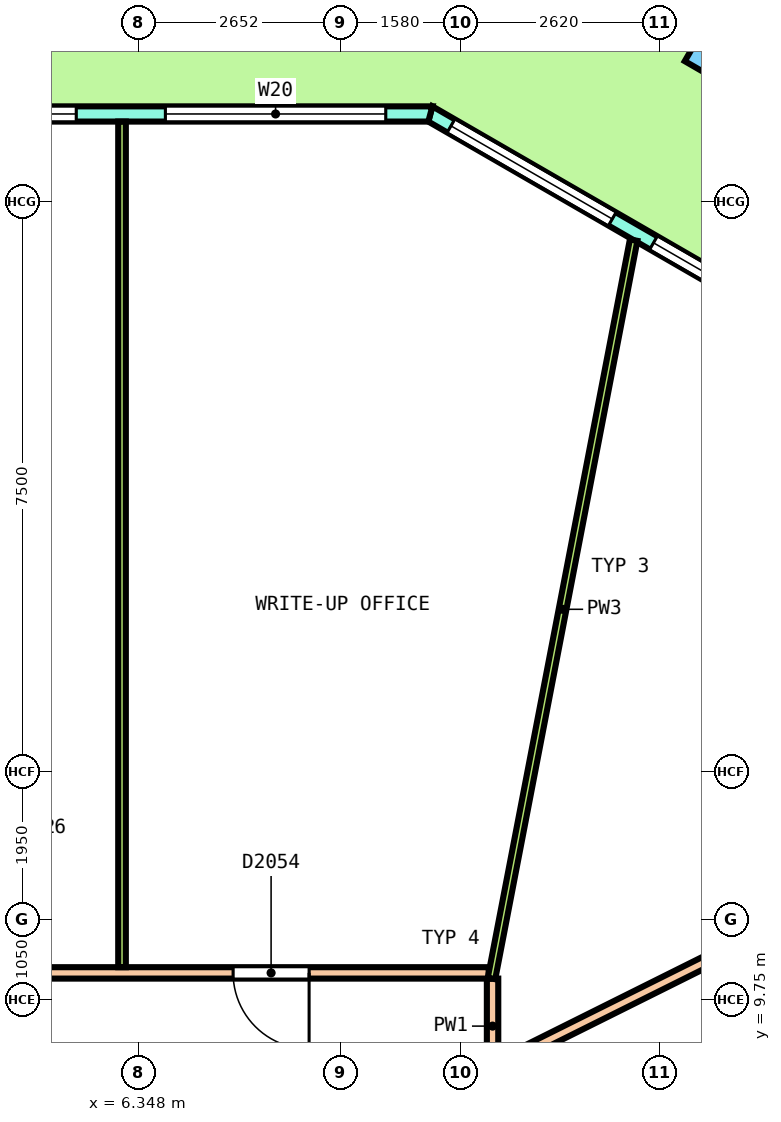
"""IFC4 building model, lengths in metres.
Left out: names, types, materials, properties, quantities, classifications, styles, units other than length and angle.
Written with IfcOpenShell. Run it as: python <this file> out.ifc"""

import sys

from ifc_helpers import new_model, si_unit, direction, frame, frame_2d, origin, origin_2d, place, context, subcontext, project, spatial, polyline, rectangle, outline, extrude, element, fill, save


model = new_model("IFC4")
c1 = context("Model", 3, precision=1e-05, world=origin(), true_north=direction((0.0, 1.0)))
c2 = subcontext(c1, "Body", "Model", "MODEL_VIEW")
j1 = project(units=[si_unit("LENGTHUNIT", "METRE"), si_unit("PLANEANGLEUNIT", "RADIAN")], contexts=[c1])
p1 = place(None, origin())
s1 = spatial("IfcSite", under=j1, at=p1, CompositionType="ELEMENT")
p2 = place(p1, origin())
s2 = spatial("IfcBuilding", under=s1, at=p2, CompositionType="ELEMENT")
p3 = place(p2, frame((0.0, 0.0, 249.4)))
s3 = spatial("IfcBuildingStorey", under=s2, at=p3, CompositionType="ELEMENT", Elevation=249.4)
p4 = place(p3, frame((14.246, 22.287, 0.0), z_axis=(0.036260511264, 0.0, 0.999342371424), x_axis=(-0.865313694921, 0.500246354177, 0.031397364786)))
e1 = element("IfcColumn", 1, at=p4, inside=s3, PredefinedType="COLUMN", context=c2, shape_type="SweptSolid", body=[
    extrude(rectangle(XDim=1.05, YDim=1.05, at=origin_2d()), origin(), (0.0, 0.0, 1.0), 3.643),
])
p5 = place(p3, frame((15.51, 18.323, 0.0), z_axis=(0.0, 0.0, 1.0), x_axis=(-0.866029647142, 0.499992650217, 0.0)))
e2 = element("IfcWall", 2, at=p5, inside=s3, PredefinedType="SOLIDWALL", context=c2, shape_type="SweptSolid", body=[
    extrude(outline(polyline([(-0.027, -0.1), (1.008, -0.1), (2.042, -0.1), (3.076, -0.1), (4.111, -0.1), (5.145, -0.1), (6.18, -0.1), (6.126, 0.1), (5.109, 0.1), (4.093, 0.1), (3.076, 0.1), (2.06, 0.1), (1.043, 0.1), (0.027, 0.1), (-0.027, -0.1)])), origin(), (0.0, 0.0, 1.0), 3.7),
])
p6 = place(p5, frame((0.313, 0.0, 0.1)))
e3 = element("IfcOpeningElement", 3, at=p6, cuts=e2, PredefinedType="OPENING", context=c2, shape_type="SweptSolid", body=[
    extrude(rectangle(XDim=2.45, YDim=2.65, at=frame_2d((1.225, 1.325))), frame((0.0, 0.11, 0.0), z_axis=(0.0, -1.0, 0.0), x_axis=(1.0, 0.0, 0.0)), (0.0, 0.0, 1.0), 0.22),
])
p7 = place(p5, frame((3.39, 0.0, 0.1)))
e4 = element("IfcOpeningElement", 4, at=p7, cuts=e2, PredefinedType="OPENING", context=c2, shape_type="SweptSolid", body=[
    extrude(rectangle(XDim=2.45, YDim=2.65, at=frame_2d((1.225, 1.325))), frame((0.0, 0.11, 0.0), z_axis=(0.0, -1.0, 0.0), x_axis=(1.0, 0.0, 0.0)), (0.0, 0.0, 1.0), 0.22),
])
p8 = place(p3, frame((10.182, 21.4, 0.0), z_axis=(0.0, 0.0, 1.0), x_axis=(-1.0, 0.0, 0.0)))
e5 = element("IfcWall", 5, at=p8, inside=s3, PredefinedType="SOLIDWALL", context=c2, shape_type="SweptSolid", body=[
    extrude(outline(polyline([(-0.027, -0.1), (0.994, -0.1), (2.015, -0.1), (3.036, -0.1), (4.057, -0.1), (5.078, -0.1), (6.098, -0.1), (7.119, -0.1), (8.14, -0.1), (9.161, -0.1), (10.182, -0.1), (11.203, -0.1), (12.224, -0.1), (13.245, -0.1), (14.265, -0.1), (15.286, -0.1), (16.307, -0.1), (17.328, -0.1), (18.349, -0.1), (19.37, -0.1), (20.391, -0.1), (20.337, 0.1), (19.321, 0.1), (18.306, 0.1), (17.291, 0.1), (16.275, 0.1), (15.259, 0.1), (14.244, 0.1), (13.229, 0.1), (12.213, 0.1), (11.197, 0.1), (10.182, 0.1), (9.167, 0.1), (8.151, 0.1), (7.135, 0.1), (6.12, 0.1), (5.104, 0.1), (4.089, 0.1), (3.073, 0.1), (2.058, 0.1), (1.042, 0.1), (0.027, 0.1), (-0.027, -0.1)])), origin(), (0.0, 0.0, 1.0), 3.7),
])
p9 = place(p8, frame((0.586, 0.0, 0.1)))
e6 = element("IfcOpeningElement", 6, at=p9, cuts=e5, PredefinedType="OPENING", context=c2, shape_type="SweptSolid", body=[
    extrude(rectangle(XDim=2.9, YDim=2.65, at=frame_2d((1.45, 1.325))), frame((0.0, 0.11, 0.0), z_axis=(0.0, -1.0, 0.0), x_axis=(1.0, 0.0, 0.0)), (0.0, 0.0, 1.0), 0.22),
])
p10 = place(p8, frame((4.659, 0.0, 0.1)))
e7 = element("IfcOpeningElement", 7, at=p10, cuts=e5, PredefinedType="OPENING", context=c2, shape_type="SweptSolid", body=[
    extrude(rectangle(XDim=2.9, YDim=2.65, at=frame_2d((1.45, 1.325))), frame((0.0, 0.11, 0.0), z_axis=(0.0, -1.0, 0.0), x_axis=(1.0, 0.0, 0.0)), (0.0, 0.0, 1.0), 0.22),
])
p11 = place(p8, frame((9.282, 0.0, 0.0)))
e8 = element("IfcOpeningElement", 8, at=p11, cuts=e5, PredefinedType="OPENING", context=c2, shape_type="SweptSolid", body=[
    extrude(rectangle(XDim=1.8, YDim=2.4, at=frame_2d((0.9, 1.2))), frame((0.0, 0.11, 0.0), z_axis=(0.0, -1.0, 0.0), x_axis=(1.0, 0.0, 0.0)), (0.0, 0.0, 1.0), 0.22),
])
p12 = place(p8, frame((9.282, 0.0, 2.55)))
e9 = element("IfcOpeningElement", 9, at=p12, cuts=e5, PredefinedType="OPENING", context=c2, shape_type="SweptSolid", body=[
    extrude(rectangle(XDim=1.8, YDim=0.2, at=frame_2d((0.9, 0.1))), frame((0.0, 0.11, 0.0), z_axis=(0.0, -1.0, 0.0), x_axis=(1.0, 0.0, 0.0)), (0.0, 0.0, 1.0), 0.22),
])
p13 = place(p8, frame((12.805, 0.0, 0.1)))
e10 = element("IfcOpeningElement", 10, at=p13, cuts=e5, PredefinedType="OPENING", context=c2, shape_type="SweptSolid", body=[
    extrude(rectangle(XDim=2.9, YDim=2.65, at=frame_2d((1.45, 1.325))), frame((0.0, 0.11, 0.0), z_axis=(0.0, -1.0, 0.0), x_axis=(1.0, 0.0, 0.0)), (0.0, 0.0, 1.0), 0.22),
])
p14 = place(p8, frame((16.877, 0.0, 0.1)))
e11 = element("IfcOpeningElement", 11, at=p14, cuts=e5, PredefinedType="OPENING", context=c2, shape_type="SweptSolid", body=[
    extrude(rectangle(XDim=2.9, YDim=2.65, at=frame_2d((1.45, 1.325))), frame((0.0, 0.11, 0.0), z_axis=(0.0, -1.0, 0.0), x_axis=(1.0, 0.0, 0.0)), (0.0, 0.0, 1.0), 0.22),
])
p15 = place(p3, frame((11.0, 7.15, 0.0), z_axis=(0.0, 0.0, 1.0), x_axis=(0.959291851816, 0.282416612542, 0.0)))
e12 = element("IfcWall", 12, at=p15, inside=s3, PredefinedType="PARTITIONING", context=c2, shape_type="SweptSolid", body=[
    extrude(rectangle(XDim=9.664, YDim=0.15, at=frame_2d((4.832, 0.0))), origin(), (0.0, 0.0, 1.0), 2.8),
])
p16 = place(p15, frame((3.137, 0.0, 0.0)))
e13 = element("IfcOpeningElement", 13, at=p16, cuts=e12, PredefinedType="OPENING", context=c2, shape_type="SweptSolid", body=[
    extrude(rectangle(XDim=1.0, YDim=2.1, at=frame_2d((0.5, 1.05))), frame((0.0, 0.085, 0.0), z_axis=(0.0, -1.0, 0.0), x_axis=(1.0, 0.0, 0.0)), (0.0, 0.0, 1.0), 0.17),
])
p17 = place(p3, frame((11.067, 8.884, 0.0), z_axis=(0.0, 0.0, 1.0), x_axis=(0.895013465437, 0.44603912013, 0.0)))
e14 = element("IfcWall", 14, at=p17, inside=s3, PredefinedType="PARTITIONING", context=c2, shape_type="SweptSolid", body=[
    extrude(rectangle(XDim=8.484, YDim=0.15, at=frame_2d((4.242, 0.0))), origin(), (0.0, 0.0, 1.0), 2.8),
])
p18 = place(p17, frame((3.604, 0.0, 0.0)))
e15 = element("IfcOpeningElement", 15, at=p18, cuts=e14, PredefinedType="OPENING", context=c2, shape_type="SweptSolid", body=[
    extrude(rectangle(XDim=1.2, YDim=2.1, at=frame_2d((0.6, 1.05))), frame((0.0, 0.085, 0.0), z_axis=(0.0, -1.0, 0.0), x_axis=(1.0, 0.0, 0.0)), (0.0, 0.0, 1.0), 0.17),
])
p19 = place(p3, frame((11.0, 8.775, 0.0), z_axis=(0.0, 0.0, 1.0), x_axis=(0.0, 1.0, 0.0)))
e16 = element("IfcWall", 16, at=p19, inside=s3, PredefinedType="PARTITIONING", context=c2, shape_type="SweptSolid", body=[
    extrude(rectangle(XDim=1.25, YDim=0.15, at=frame_2d((0.625, 0.0))), origin(), (0.0, 0.0, 1.0), 2.8),
])
p20 = place(p3, frame((-10.925, 10.1, 0.0), z_axis=(0.0, 0.0, 1.0), x_axis=(1.0, 0.0, 0.0)))
e17 = element("IfcWall", 17, at=p20, inside=s3, PredefinedType="PARTITIONING", context=c2, shape_type="SweptSolid", body=[
    extrude(rectangle(XDim=21.875, YDim=0.15, at=frame_2d((10.938, 0.0))), origin(), (0.0, 0.0, 1.0), 2.8),
])
p21 = place(p20, frame((18.511, 0.0, 0.0)))
e18 = element("IfcOpeningElement", 18, at=p21, cuts=e17, PredefinedType="OPENING", context=c2, shape_type="SweptSolid", body=[
    extrude(rectangle(XDim=1.0, YDim=2.1, at=frame_2d((0.5, 1.05))), frame((0.0, 0.085, 0.0), z_axis=(0.0, -1.0, 0.0), x_axis=(1.0, 0.0, 0.0)), (0.0, 0.0, 1.0), 0.17),
])
p22 = place(p20, frame((10.85, 0.0, 0.0)))
e19 = element("IfcOpeningElement", 19, at=p22, cuts=e17, PredefinedType="OPENING", context=c2, shape_type="SweptSolid", body=[
    extrude(rectangle(XDim=1.0, YDim=2.1, at=frame_2d((0.5, 1.05))), frame((0.0, 0.085, 0.0), z_axis=(0.0, -1.0, 0.0), x_axis=(1.0, 0.0, 0.0)), (0.0, 0.0, 1.0), 0.17),
])
p23 = place(p20, frame((5.767, 0.0, 0.0)))
e20 = element("IfcOpeningElement", 20, at=p23, cuts=e17, PredefinedType="OPENING", context=c2, shape_type="SweptSolid", body=[
    extrude(rectangle(XDim=1.2, YDim=2.1, at=frame_2d((0.6, 1.05))), frame((0.0, 0.085, 0.0), z_axis=(0.0, -1.0, 0.0), x_axis=(1.0, 0.0, 0.0)), (0.0, 0.0, 1.0), 0.17),
])
p24 = place(p3, frame((10.986, 10.026, 0.0), z_axis=(0.0, 0.0, 1.0), x_axis=(0.189067988583, 0.981963999184, 0.0)))
e21 = element("IfcWall", 21, at=p24, inside=s3, PredefinedType="PARTITIONING", context=c2, shape_type="SweptSolid", body=[
    extrude(rectangle(XDim=9.893, YDim=0.1, at=frame_2d((4.946, 0.0))), origin(), (0.0, 0.0, 1.0), 2.8),
])
p25 = place(p3, frame((6.125, 10.175, 0.0), z_axis=(0.0, 0.0, 1.0), x_axis=(0.0, 1.0, 0.0)))
e22 = element("IfcWall", 22, at=p25, inside=s3, PredefinedType="PARTITIONING", context=c2, shape_type="SweptSolid", body=[
    extrude(rectangle(XDim=11.125, YDim=0.1, at=frame_2d((5.562, 0.0))), origin(), (0.0, 0.0, 1.0), 2.8),
])
p26 = place(p6, origin())
e23 = element("IfcWindow", 23, at=p26, inside=s3, PartitioningType="SINGLE_PANEL", PredefinedType="WINDOW", context=c2, shape_type="SweptSolid", body=[
    extrude(rectangle(XDim=2.45, YDim=2.65, at=frame_2d((1.225, 1.325))), frame((0.0, 0.03, 0.0), z_axis=(0.0, -1.0, 0.0), x_axis=(1.0, 0.0, 0.0)), (0.0, 0.0, 1.0), 0.06),
])
fill(e3, e23)
p27 = place(p7, origin())
e24 = element("IfcWindow", 24, at=p27, inside=s3, PartitioningType="SINGLE_PANEL", PredefinedType="WINDOW", context=c2, shape_type="SweptSolid", body=[
    extrude(rectangle(XDim=2.45, YDim=2.65, at=frame_2d((1.225, 1.325))), frame((0.0, 0.03, 0.0), z_axis=(0.0, -1.0, 0.0), x_axis=(1.0, 0.0, 0.0)), (0.0, 0.0, 1.0), 0.06),
])
fill(e4, e24)
p28 = place(p9, origin())
e25 = element("IfcWindow", 25, at=p28, inside=s3, PartitioningType="SINGLE_PANEL", PredefinedType="WINDOW", context=c2, shape_type="SweptSolid", body=[
    extrude(rectangle(XDim=2.9, YDim=2.65, at=frame_2d((1.45, 1.325))), frame((0.0, 0.03, 0.0), z_axis=(0.0, -1.0, 0.0), x_axis=(1.0, 0.0, 0.0)), (0.0, 0.0, 1.0), 0.06),
])
fill(e6, e25)
p29 = place(p10, origin())
e26 = element("IfcWindow", 26, at=p29, inside=s3, PartitioningType="SINGLE_PANEL", PredefinedType="WINDOW", context=c2, shape_type="SweptSolid", body=[
    extrude(rectangle(XDim=2.9, YDim=2.65, at=frame_2d((1.45, 1.325))), frame((0.0, 0.03, 0.0), z_axis=(0.0, -1.0, 0.0), x_axis=(1.0, 0.0, 0.0)), (0.0, 0.0, 1.0), 0.06),
])
fill(e7, e26)
p30 = place(p21, origin())
e27 = element("IfcDoor", 27, at=p30, inside=s3, OperationType="SINGLE_SWING_RIGHT", PredefinedType="DOOR", context=c2, shape_type="SweptSolid", body=[
    extrude(rectangle(XDim=1.0, YDim=2.1, at=frame_2d((0.5, 1.05))), frame((0.0, 0.025, 0.0), z_axis=(0.0, -1.0, 0.0), x_axis=(1.0, 0.0, 0.0)), (0.0, 0.0, 1.0), 0.05),
])
fill(e18, e27)
save(model, sys.argv[1])
